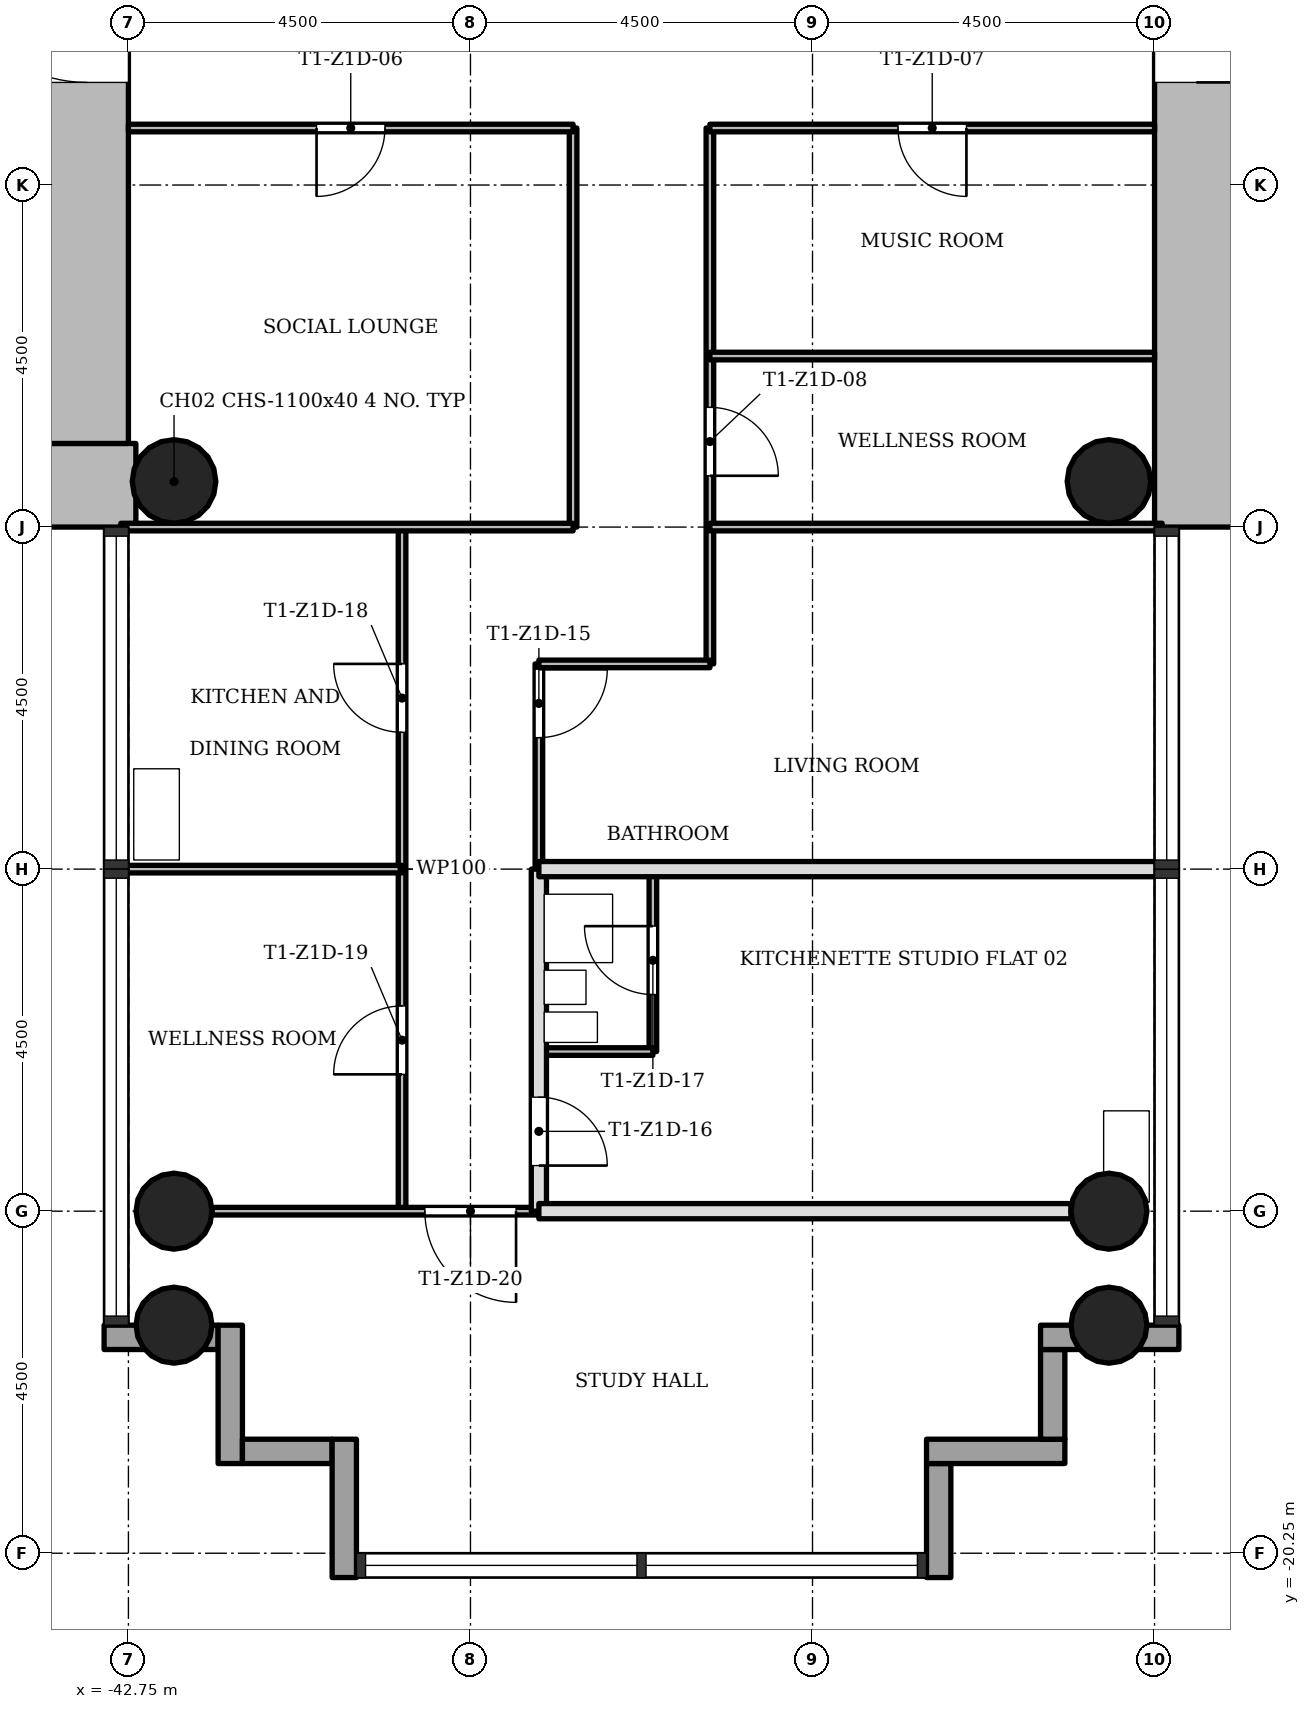
"""IFC4 building model, lengths in metres.
Left out: names, types, materials, properties, quantities, classifications, styles, units other than length and angle.
Written with IfcOpenShell. Run it as: python <this file> out.ifc"""

import sys

from ifc_helpers import new_model, si_unit, direction, frame, frame_2d, origin, origin_2d, place, context, subcontext, project, spatial, rectangle, hollow_circle, extrude, element, fill, save


model = new_model("IFC4")
c1 = context("Model", 3, precision=1e-05, world=origin(), true_north=direction((0.0, 1.0)))
c2 = subcontext(c1, "Body", "Model", "MODEL_VIEW")
j1 = project(units=[si_unit("LENGTHUNIT", "METRE"), si_unit("PLANEANGLEUNIT", "RADIAN")], contexts=[c1])
p1 = place(None, origin())
s1 = spatial("IfcSite", under=j1, at=p1, CompositionType="ELEMENT")
p2 = place(p1, origin())
s2 = spatial("IfcBuilding", under=s1, at=p2, CompositionType="ELEMENT")
p3 = place(p2, frame((0.0, 0.0, 55.1)))
s3 = spatial("IfcBuildingStorey", under=s2, at=p3, CompositionType="ELEMENT", Elevation=55.1)
p4 = place(p3, frame((-28.7, 5.65, 0.0), z_axis=(0.0, 0.0, 1.0), x_axis=(0.0, -1.0, 0.0)))
e1 = element("IfcWall", 1, at=p4, inside=s3, PredefinedType="SHEAR", context=c2, shape_type="SweptSolid", body=[
    extrude(rectangle(XDim=12.4, YDim=1.1, at=frame_2d((6.2, 0.0))), origin(), (0.0, 0.0, 1.0), 3.4),
])
p5 = place(p4, frame((4.75, 0.0, 0.0)))
e2 = element("IfcOpeningElement", 2, at=p5, cuts=e1, PredefinedType="OPENING", context=c2, shape_type="SweptSolid", body=[
    extrude(rectangle(XDim=1.8, YDim=2.1, at=frame_2d((0.9, 1.05))), frame((0.0, 0.56, 0.0), z_axis=(0.0, -1.0, 0.0), x_axis=(1.0, 0.0, 0.0)), (0.0, 0.0, 1.0), 1.12),
])
p6 = place(p3, frame((-50.65, -6.2, 0.0), z_axis=(0.0, 0.0, 1.0), x_axis=(1.0, 0.0, 0.0)))
e3 = element("IfcWall", 3, at=p6, inside=s3, PredefinedType="SHEAR", context=c2, shape_type="SweptSolid", body=[
    extrude(rectangle(XDim=7.998, YDim=1.1, at=frame_2d((3.999, 0.0))), origin(), (0.0, 0.0, 1.0), 3.4),
])
p7 = place(p3, frame((-43.3, -5.65, 0.0), z_axis=(0.0, 0.0, 1.0), x_axis=(0.0, 1.0, 0.0)))
e4 = element("IfcWall", 4, at=p7, inside=s3, PredefinedType="SHEAR", context=c2, shape_type="SweptSolid", body=[
    extrude(rectangle(XDim=12.4, YDim=1.1, at=frame_2d((6.2, 0.0))), origin(), (0.0, 0.0, 1.0), 3.4),
])
p8 = place(p7, frame((4.75, 0.0, 0.0)))
e5 = element("IfcOpeningElement", 5, at=p8, cuts=e4, PredefinedType="OPENING", context=c2, shape_type="SweptSolid", body=[
    extrude(rectangle(XDim=1.8, YDim=2.1, at=frame_2d((0.9, 1.05))), frame((0.0, 0.56, 0.0), z_axis=(0.0, -1.0, 0.0), x_axis=(1.0, 0.0, 0.0)), (0.0, 0.0, 1.0), 1.12),
])
for number, where, z_axis, x_axis in (
    (6, (-42.15, -15.75, 0.0), (0.0, 0.0, 1.0), (1.0, 0.0, 0.0)),
    (7, (-29.85, -15.75, 0.0), (0.0, 0.0, 1.0), (1.0, 0.0, 0.0)),
    (8, (-42.15, -17.25, 0.0), (0.0, 0.0, 1.0), (1.0, 0.0, 0.0)),
    (9, (-29.85, -17.25, 0.0), (0.0, 0.0, 1.0), (1.0, 0.0, 0.0)),
):
    element("IfcColumn", number, at=place(p3, frame(where, z_axis=z_axis, x_axis=x_axis)), inside=s3, PredefinedType="COLUMN", context=c2, shape_type="SweptSolid", body=[
        extrude(hollow_circle(Radius=0.5, WallThickness=0.036, at=origin_2d()), origin(), (0.0, 0.0, 1.0), 3.4),
    ])
for number, where, z_axis, x_axis in (
    (10, (-42.15, -6.15, 0.0), (0.0, 0.0, 1.0), (1.0, 0.0, 0.0)),
    (11, (-29.85, -6.15, 0.0), (0.0, 0.0, 1.0), (1.0, 0.0, 0.0)),
):
    element("IfcColumn", number, at=place(p3, frame(where, z_axis=z_axis, x_axis=x_axis)), inside=s3, PredefinedType="COLUMN", context=c2, shape_type="SweptSolid", body=[
        extrude(hollow_circle(Radius=0.55, WallThickness=0.04, at=origin_2d()), origin(), (0.0, 0.0, 1.0), 3.4),
    ])
p9 = place(p3, frame((-43.07, -17.41, -0.3), z_axis=(0.0, 0.0, 1.0), x_axis=(1.0, 0.0, 0.0)))
e12 = element("IfcWall", 12, at=p9, inside=s3, PredefinedType="STANDARD", context=c2, shape_type="SweptSolid", body=[
    extrude(rectangle(XDim=1.5, YDim=0.32, at=frame_2d((0.75, 0.0))), origin(), (0.0, 0.0, 1.0), 3.4),
])
p10 = place(p3, frame((-41.41, -17.25, -0.3), z_axis=(0.0, 0.0, 1.0), x_axis=(0.0, -1.0, 0.0)))
e13 = element("IfcWall", 13, at=p10, inside=s3, PredefinedType="STANDARD", context=c2, shape_type="SweptSolid", body=[
    extrude(rectangle(XDim=1.82, YDim=0.32, at=frame_2d((0.91, 0.0))), origin(), (0.0, 0.0, 1.0), 3.4),
])
p11 = place(p3, frame((-41.25, -18.91, -0.3), z_axis=(0.0, 0.0, 1.0), x_axis=(1.0, 0.0, 0.0)))
e14 = element("IfcWall", 14, at=p11, inside=s3, PredefinedType="STANDARD", context=c2, shape_type="SweptSolid", body=[
    extrude(rectangle(XDim=1.18, YDim=0.32, at=frame_2d((0.59, 0.0))), origin(), (0.0, 0.0, 1.0), 3.4),
])
p12 = place(p3, frame((-39.91, -18.75, -0.3), z_axis=(0.0, 0.0, 1.0), x_axis=(0.0, -1.0, 0.0)))
e15 = element("IfcWall", 15, at=p12, inside=s3, PredefinedType="STANDARD", context=c2, shape_type="SweptSolid", body=[
    extrude(rectangle(XDim=1.82, YDim=0.32, at=frame_2d((0.91, 0.0))), origin(), (0.0, 0.0, 1.0), 3.4),
])
p13 = place(p3, frame((-32.09, -20.57, -0.3), z_axis=(0.0, 0.0, 1.0), x_axis=(0.0, 1.0, 0.0)))
e16 = element("IfcWall", 16, at=p13, inside=s3, PredefinedType="STANDARD", context=c2, shape_type="SweptSolid", body=[
    extrude(rectangle(XDim=1.5, YDim=0.32, at=frame_2d((0.75, 0.0))), origin(), (0.0, 0.0, 1.0), 3.4),
])
p14 = place(p3, frame((-32.25, -18.91, -0.3), z_axis=(0.0, 0.0, 1.0), x_axis=(1.0, 0.0, 0.0)))
e17 = element("IfcWall", 17, at=p14, inside=s3, PredefinedType="STANDARD", context=c2, shape_type="SweptSolid", body=[
    extrude(rectangle(XDim=1.82, YDim=0.32, at=frame_2d((0.91, 0.0))), origin(), (0.0, 0.0, 1.0), 3.4),
])
p15 = place(p3, frame((-30.59, -18.75, -0.3), z_axis=(0.0, 0.0, 1.0), x_axis=(0.0, 1.0, 0.0)))
e18 = element("IfcWall", 18, at=p15, inside=s3, PredefinedType="STANDARD", context=c2, shape_type="SweptSolid", body=[
    extrude(rectangle(XDim=1.18, YDim=0.32, at=frame_2d((0.59, 0.0))), origin(), (0.0, 0.0, 1.0), 3.4),
])
p16 = place(p3, frame((-30.75, -17.41, -0.3), z_axis=(0.0, 0.0, 1.0), x_axis=(1.0, 0.0, 0.0)))
e19 = element("IfcWall", 19, at=p16, inside=s3, PredefinedType="STANDARD", context=c2, shape_type="SweptSolid", body=[
    extrude(rectangle(XDim=1.82, YDim=0.32, at=frame_2d((0.91, 0.0))), origin(), (0.0, 0.0, 1.0), 3.4),
])
p17 = place(p3, frame((-39.15, -15.75, 0.0), z_axis=(0.0, 0.0, 1.0), x_axis=(0.0, 1.0, 0.0)))
e20 = element("IfcWall", 20, at=p17, inside=s3, PredefinedType="PARTITIONING", context=c2, shape_type="SweptSolid", body=[
    extrude(rectangle(XDim=9.0, YDim=0.1, at=frame_2d((4.5, 0.0))), origin(), (0.0, 0.0, 1.0), 3.0),
])
p18 = place(p17, frame((6.3, 0.0, 0.0)))
e21 = element("IfcOpeningElement", 21, at=p18, cuts=e20, PredefinedType="OPENING", context=c2, shape_type="SweptSolid", body=[
    extrude(rectangle(XDim=0.9, YDim=2.1, at=frame_2d((0.45, 1.05))), frame((0.0, 0.06, 0.0), z_axis=(0.0, -1.0, 0.0), x_axis=(1.0, 0.0, 0.0)), (0.0, 0.0, 1.0), 0.12),
])
p19 = place(p17, frame((1.8, 0.0, 0.0)))
e22 = element("IfcOpeningElement", 22, at=p19, cuts=e20, PredefinedType="OPENING", context=c2, shape_type="SweptSolid", body=[
    extrude(rectangle(XDim=0.9, YDim=2.1, at=frame_2d((0.45, 1.05))), frame((0.0, 0.06, 0.0), z_axis=(0.0, -1.0, 0.0), x_axis=(1.0, 0.0, 0.0)), (0.0, 0.0, 1.0), 0.12),
])
p20 = place(p3, frame((-37.35, -11.25, 0.0), z_axis=(0.0, 0.0, 1.0), x_axis=(0.0, 1.0, 0.0)))
e23 = element("IfcWall", 23, at=p20, inside=s3, PredefinedType="PARTITIONING", context=c2, shape_type="SweptSolid", body=[
    extrude(rectangle(XDim=2.7, YDim=0.1, at=frame_2d((1.35, 0.0))), origin(), (0.0, 0.0, 1.0), 3.0),
])
p21 = place(p20, frame((1.73, 0.0, 0.0)))
e24 = element("IfcOpeningElement", 24, at=p21, cuts=e23, PredefinedType="OPENING", context=c2, shape_type="SweptSolid", body=[
    extrude(rectangle(XDim=0.9, YDim=2.1, at=frame_2d((0.45, 1.05))), frame((0.0, 0.06, 0.0), z_axis=(0.0, -1.0, 0.0), x_axis=(1.0, 0.0, 0.0)), (0.0, 0.0, 1.0), 0.12),
])
p22 = place(p3, frame((-37.35, -15.75, 0.0), z_axis=(0.0, 0.0, 1.0), x_axis=(0.0, 1.0, 0.0)))
e25 = element("IfcWall", 25, at=p22, inside=s3, PredefinedType="SOLIDWALL", context=c2, shape_type="SweptSolid", body=[
    extrude(rectangle(XDim=4.5, YDim=0.2, at=frame_2d((2.25, 0.0))), origin(), (0.0, 0.0, 1.0), 3.0),
])
p23 = place(p22, frame((0.6, 0.0, 0.0)))
e26 = element("IfcOpeningElement", 26, at=p23, cuts=e25, PredefinedType="OPENING", context=c2, shape_type="SweptSolid", body=[
    extrude(rectangle(XDim=0.9, YDim=2.1, at=frame_2d((0.45, 1.05))), frame((0.0, 0.11, 0.0), z_axis=(0.0, -1.0, 0.0), x_axis=(1.0, 0.0, 0.0)), (0.0, 0.0, 1.0), 0.22),
])
p24 = place(p3, frame((-36.9, -6.75, 0.0), z_axis=(0.0, 0.0, 1.0), x_axis=(0.0, 1.0, 0.0)))
e27 = element("IfcWall", 27, at=p24, inside=s3, PredefinedType="PARTITIONING", context=c2, shape_type="SweptSolid", body=[
    extrude(rectangle(XDim=5.25, YDim=0.1, at=frame_2d((2.625, 0.0))), origin(), (0.0, 0.0, 1.0), 3.0),
])
p25 = place(p3, frame((-35.85, -13.65, 0.0), z_axis=(0.0, 0.0, 1.0), x_axis=(0.0, 1.0, 0.0)))
e28 = element("IfcWall", 28, at=p25, inside=s3, PredefinedType="PARTITIONING", context=c2, shape_type="SweptSolid", body=[
    extrude(rectangle(XDim=2.4, YDim=0.1, at=frame_2d((1.2, 0.0))), origin(), (0.0, 0.0, 1.0), 3.0),
])
p26 = place(p25, frame((0.75, 0.0, 0.0)))
e29 = element("IfcOpeningElement", 29, at=p26, cuts=e28, PredefinedType="OPENING", context=c2, shape_type="SweptSolid", body=[
    extrude(rectangle(XDim=0.9, YDim=2.1, at=frame_2d((0.45, 1.05))), frame((0.0, 0.06, 0.0), z_axis=(0.0, -1.0, 0.0), x_axis=(1.0, 0.0, 0.0)), (0.0, 0.0, 1.0), 0.12),
])
p27 = place(p3, frame((-35.1, -8.55, 0.0), z_axis=(0.0, 0.0, 1.0), x_axis=(0.0, 1.0, 0.0)))
e30 = element("IfcWall", 30, at=p27, inside=s3, PredefinedType="PARTITIONING", context=c2, shape_type="SweptSolid", body=[
    extrude(rectangle(XDim=7.05, YDim=0.1, at=frame_2d((3.525, 0.0))), origin(), (0.0, 0.0, 1.0), 3.0),
])
p28 = place(p27, frame((2.475, 0.0, 0.0)))
e31 = element("IfcOpeningElement", 31, at=p28, cuts=e30, PredefinedType="OPENING", context=c2, shape_type="SweptSolid", body=[
    extrude(rectangle(XDim=0.9, YDim=2.1, at=frame_2d((0.45, 1.05))), frame((0.0, 0.06, 0.0), z_axis=(0.0, -1.0, 0.0), x_axis=(1.0, 0.0, 0.0)), (0.0, 0.0, 1.0), 0.12),
])
p29 = place(p3, frame((-41.65, -15.75, 0.0), z_axis=(0.0, 0.0, 1.0), x_axis=(1.0, 0.0, 0.0)))
e32 = element("IfcWall", 32, at=p29, inside=s3, PredefinedType="PARTITIONING", context=c2, shape_type="SweptSolid", body=[
    extrude(rectangle(XDim=4.3, YDim=0.1, at=frame_2d((2.15, 0.0))), origin(), (0.0, 0.0, 1.0), 3.0),
])
p30 = place(p29, frame((2.8, 0.0, 0.0)))
e33 = element("IfcOpeningElement", 33, at=p30, cuts=e32, PredefinedType="OPENING", context=c2, shape_type="SweptSolid", body=[
    extrude(rectangle(XDim=1.2, YDim=2.1, at=frame_2d((0.6, 1.05))), frame((0.0, 0.06, 0.0), z_axis=(0.0, -1.0, 0.0), x_axis=(1.0, 0.0, 0.0)), (0.0, 0.0, 1.0), 0.12),
])
p31 = place(p3, frame((-37.35, -15.75, 0.0), z_axis=(0.0, 0.0, 1.0), x_axis=(1.0, 0.0, 0.0)))
e34 = element("IfcWall", 34, at=p31, inside=s3, PredefinedType="SOLIDWALL", context=c2, shape_type="SweptSolid", body=[
    extrude(rectangle(XDim=7.0, YDim=0.2, at=frame_2d((3.5, 0.0))), origin(), (0.0, 0.0, 1.0), 3.0),
])
p32 = place(p3, frame((-37.35, -13.65, 0.0), z_axis=(0.0, 0.0, 1.0), x_axis=(1.0, 0.0, 0.0)))
e35 = element("IfcWall", 35, at=p32, inside=s3, PredefinedType="PARTITIONING", context=c2, shape_type="SweptSolid", body=[
    extrude(rectangle(XDim=1.5, YDim=0.1, at=frame_2d((0.75, 0.0))), origin(), (0.0, 0.0, 1.0), 3.0),
])
p33 = place(p3, frame((-42.85, -11.25, 0.0), z_axis=(0.0, 0.0, 1.0), x_axis=(1.0, 0.0, 0.0)))
e36 = element("IfcWall", 36, at=p33, inside=s3, PredefinedType="PARTITIONING", context=c2, shape_type="SweptSolid", body=[
    extrude(rectangle(XDim=3.7, YDim=0.1, at=frame_2d((1.85, 0.0))), origin(), (0.0, 0.0, 1.0), 3.0),
])
p34 = place(p3, frame((-37.35, -11.25, 0.0), z_axis=(0.0, 0.0, 1.0), x_axis=(1.0, 0.0, 0.0)))
e37 = element("IfcWall", 37, at=p34, inside=s3, PredefinedType="SOLIDWALL", context=c2, shape_type="SweptSolid", body=[
    extrude(rectangle(XDim=8.2, YDim=0.2, at=frame_2d((4.1, 0.0))), origin(), (0.0, 0.0, 1.0), 3.0),
])
p35 = place(p3, frame((-37.35, -8.55, 0.0), z_axis=(0.0, 0.0, 1.0), x_axis=(1.0, 0.0, 0.0)))
e38 = element("IfcWall", 38, at=p35, inside=s3, PredefinedType="PARTITIONING", context=c2, shape_type="SweptSolid", body=[
    extrude(rectangle(XDim=2.25, YDim=0.1, at=frame_2d((1.125, 0.0))), origin(), (0.0, 0.0, 1.0), 3.0),
])
for number, where, z_axis, x_axis in (
    (39, (-42.85, -6.75, 0.0), (0.0, 0.0, 1.0), (1.0, 0.0, 0.0)),
    (40, (-35.1, -6.75, 0.0), (0.0, 0.0, 1.0), (1.0, 0.0, 0.0)),
):
    element("IfcWall", number, at=place(p3, frame(where, z_axis=z_axis, x_axis=x_axis)), inside=s3, PredefinedType="PARTITIONING", context=c2, shape_type="SweptSolid", body=[
        extrude(rectangle(XDim=5.95, YDim=0.1, at=frame_2d((2.975, 0.0))), origin(), (0.0, 0.0, 1.0), 3.0),
    ])
p36 = place(p3, frame((-35.1, -4.5, 0.0), z_axis=(0.0, 0.0, 1.0), x_axis=(1.0, 0.0, 0.0)))
e41 = element("IfcWall", 41, at=p36, inside=s3, PredefinedType="PARTITIONING", context=c2, shape_type="SweptSolid", body=[
    extrude(rectangle(XDim=5.85, YDim=0.1, at=frame_2d((2.925, 0.0))), origin(), (0.0, 0.0, 1.0), 3.0),
])
p37 = place(p3, frame((-42.75, -1.5, 0.0), z_axis=(0.0, 0.0, 1.0), x_axis=(1.0, 0.0, 0.0)))
e42 = element("IfcWall", 42, at=p37, inside=s3, PredefinedType="PARTITIONING", context=c2, shape_type="SweptSolid", body=[
    extrude(rectangle(XDim=5.85, YDim=0.1, at=frame_2d((2.925, 0.0))), origin(), (0.0, 0.0, 1.0), 3.0),
])
p38 = place(p37, frame((2.475, 0.0, 0.0)))
e43 = element("IfcOpeningElement", 43, at=p38, cuts=e42, PredefinedType="OPENING", context=c2, shape_type="SweptSolid", body=[
    extrude(rectangle(XDim=0.9, YDim=2.1, at=frame_2d((0.45, 1.05))), frame((0.0, 0.06, 0.0), z_axis=(0.0, -1.0, 0.0), x_axis=(1.0, 0.0, 0.0)), (0.0, 0.0, 1.0), 0.12),
])
p39 = place(p3, frame((-35.1, -1.5, 0.0), z_axis=(0.0, 0.0, 1.0), x_axis=(1.0, 0.0, 0.0)))
e44 = element("IfcWall", 44, at=p39, inside=s3, PredefinedType="PARTITIONING", context=c2, shape_type="SweptSolid", body=[
    extrude(rectangle(XDim=5.85, YDim=0.1, at=frame_2d((2.925, 0.0))), origin(), (0.0, 0.0, 1.0), 3.0),
])
p40 = place(p39, frame((2.475, 0.0, 0.0)))
e45 = element("IfcOpeningElement", 45, at=p40, cuts=e44, PredefinedType="OPENING", context=c2, shape_type="SweptSolid", body=[
    extrude(rectangle(XDim=0.9, YDim=2.1, at=frame_2d((0.45, 1.05))), frame((0.0, 0.06, 0.0), z_axis=(0.0, -1.0, 0.0), x_axis=(1.0, 0.0, 0.0)), (0.0, 0.0, 1.0), 0.12),
])
p41 = place(p38, origin())
e46 = element("IfcDoor", 46, at=p41, inside=s3, OperationType="SINGLE_SWING_LEFT", PredefinedType="DOOR", context=c2, shape_type="SweptSolid", body=[
    extrude(rectangle(XDim=0.9, YDim=2.1, at=frame_2d((0.45, 1.05))), frame((0.0, 0.025, 0.0), z_axis=(0.0, -1.0, 0.0), x_axis=(1.0, 0.0, 0.0)), (0.0, 0.0, 1.0), 0.05),
])
fill(e43, e46)
p42 = place(p40, origin())
e47 = element("IfcDoor", 47, at=p42, inside=s3, OperationType="SINGLE_SWING_RIGHT", PredefinedType="DOOR", context=c2, shape_type="SweptSolid", body=[
    extrude(rectangle(XDim=0.9, YDim=2.1, at=frame_2d((0.45, 1.05))), frame((0.0, 0.025, 0.0), z_axis=(0.0, -1.0, 0.0), x_axis=(1.0, 0.0, 0.0)), (0.0, 0.0, 1.0), 0.05),
])
fill(e45, e47)
p43 = place(p28, origin())
e48 = element("IfcDoor", 48, at=p43, inside=s3, OperationType="SINGLE_SWING_LEFT", PredefinedType="DOOR", context=c2, shape_type="SweptSolid", body=[
    extrude(rectangle(XDim=0.9, YDim=2.1, at=frame_2d((0.45, 1.05))), frame((0.0, 0.025, 0.0), z_axis=(0.0, -1.0, 0.0), x_axis=(1.0, 0.0, 0.0)), (0.0, 0.0, 1.0), 0.05),
])
fill(e31, e48)
p44 = place(p21, origin())
e49 = element("IfcDoor", 49, at=p44, inside=s3, OperationType="SINGLE_SWING_RIGHT", PredefinedType="DOOR", context=c2, shape_type="SweptSolid", body=[
    extrude(rectangle(XDim=0.9, YDim=2.1, at=frame_2d((0.45, 1.05))), frame((0.0, 0.025, 0.0), z_axis=(0.0, -1.0, 0.0), x_axis=(1.0, 0.0, 0.0)), (0.0, 0.0, 1.0), 0.05),
])
fill(e24, e49)
p45 = place(p23, origin())
e50 = element("IfcDoor", 50, at=p45, inside=s3, OperationType="SINGLE_SWING_LEFT", PredefinedType="DOOR", context=c2, shape_type="SweptSolid", body=[
    extrude(rectangle(XDim=0.9, YDim=2.1, at=frame_2d((0.45, 1.05))), frame((0.0, 0.025, 0.0), z_axis=(0.0, -1.0, 0.0), x_axis=(1.0, 0.0, 0.0)), (0.0, 0.0, 1.0), 0.05),
])
fill(e26, e50)
p46 = place(p26, origin())
e51 = element("IfcDoor", 51, at=p46, inside=s3, OperationType="SINGLE_SWING_LEFT", PredefinedType="DOOR", context=c2, shape_type="SweptSolid", body=[
    extrude(rectangle(XDim=0.9, YDim=2.1, at=frame_2d((0.45, 1.05))), frame((0.0, 0.025, 0.0), z_axis=(0.0, -1.0, 0.0), x_axis=(1.0, 0.0, 0.0)), (0.0, 0.0, 1.0), 0.05),
])
fill(e29, e51)
p47 = place(p18, origin())
e52 = element("IfcDoor", 52, at=p47, inside=s3, OperationType="SINGLE_SWING_LEFT", PredefinedType="DOOR", context=c2, shape_type="SweptSolid", body=[
    extrude(rectangle(XDim=0.9, YDim=2.1, at=frame_2d((0.45, 1.05))), frame((0.0, 0.025, 0.0), z_axis=(0.0, -1.0, 0.0), x_axis=(1.0, 0.0, 0.0)), (0.0, 0.0, 1.0), 0.05),
])
fill(e21, e52)
p48 = place(p19, origin())
e53 = element("IfcDoor", 53, at=p48, inside=s3, OperationType="SINGLE_SWING_RIGHT", PredefinedType="DOOR", context=c2, shape_type="SweptSolid", body=[
    extrude(rectangle(XDim=0.9, YDim=2.1, at=frame_2d((0.45, 1.05))), frame((0.0, 0.025, 0.0), z_axis=(0.0, -1.0, 0.0), x_axis=(1.0, 0.0, 0.0)), (0.0, 0.0, 1.0), 0.05),
])
fill(e22, e53)
p49 = place(p30, origin())
e54 = element("IfcDoor", 54, at=p49, inside=s3, OperationType="SINGLE_SWING_RIGHT", PredefinedType="DOOR", context=c2, shape_type="SweptSolid", body=[
    extrude(rectangle(XDim=1.2, YDim=2.1, at=frame_2d((0.6, 1.05))), frame((0.0, 0.025, 0.0), z_axis=(0.0, -1.0, 0.0), x_axis=(1.0, 0.0, 0.0)), (0.0, 0.0, 1.0), 0.05),
])
fill(e33, e54)
p50 = place(p5, origin())
e55 = element("IfcDoor", 55, at=p50, inside=s3, OperationType="SINGLE_SWING_LEFT", PredefinedType="DOOR", context=c2, shape_type="SweptSolid", body=[
    extrude(rectangle(XDim=1.8, YDim=2.1, at=frame_2d((0.9, 1.05))), frame((0.0, 0.025, 0.0), z_axis=(0.0, -1.0, 0.0), x_axis=(1.0, 0.0, 0.0)), (0.0, 0.0, 1.0), 0.05),
])
fill(e2, e55)
p51 = place(p8, origin())
e56 = element("IfcDoor", 56, at=p51, inside=s3, OperationType="SINGLE_SWING_LEFT", PredefinedType="DOOR", context=c2, shape_type="SweptSolid", body=[
    extrude(rectangle(XDim=1.8, YDim=2.1, at=frame_2d((0.9, 1.05))), frame((0.0, 0.025, 0.0), z_axis=(0.0, -1.0, 0.0), x_axis=(1.0, 0.0, 0.0)), (0.0, 0.0, 1.0), 0.05),
])
fill(e5, e56)
save(model, sys.argv[1])
